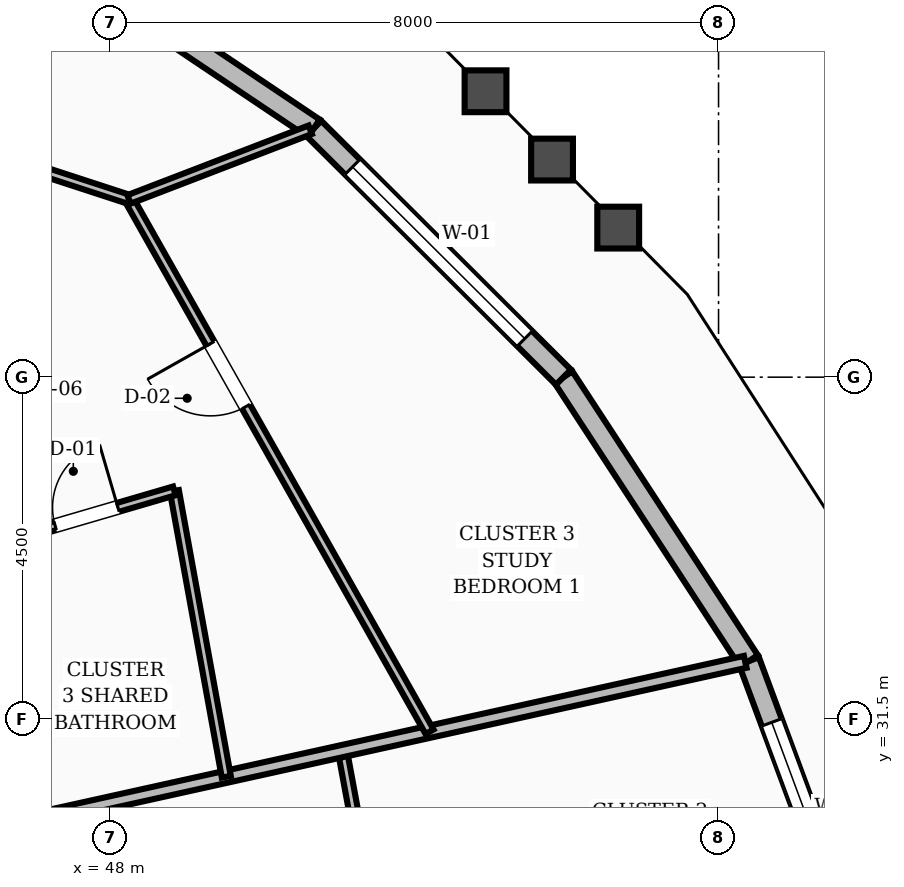
"""IFC4 building model, lengths in metres.
Left out: names, types, materials, properties, quantities, classifications, styles, units other than length and angle.
Written with IfcOpenShell. Run it as: python <this file> out.ifc"""

import sys

from ifc_helpers import new_model, si_unit, direction, frame, frame_2d, origin, place, context, subcontext, project, spatial, rectangle, extrude, element, fill, save


model = new_model("IFC4")
c1 = context("Model", 3, precision=1e-05, world=origin(), true_north=direction((0.0, 1.0)))
c2 = subcontext(c1, "Body", "Model", "MODEL_VIEW")
j1 = project(units=[si_unit("LENGTHUNIT", "METRE"), si_unit("PLANEANGLEUNIT", "RADIAN")], contexts=[c1])
p1 = place(None, origin())
s1 = spatial("IfcSite", under=j1, at=p1, CompositionType="ELEMENT")
p2 = place(p1, origin())
s2 = spatial("IfcBuilding", under=s1, at=p2, CompositionType="ELEMENT")
p3 = place(p2, frame((0.0, 0.0, 146.0)))
s3 = spatial("IfcBuildingStorey", under=s2, at=p3, CompositionType="ELEMENT", Elevation=146.0)
p4 = place(p3, frame((57.903, 28.214, 0.0), z_axis=(0.0, 0.0, 1.0), x_axis=(-0.347777987911, 0.937576914778, 0.0)))
e1 = element("IfcWall", 1, at=p4, inside=s3, PredefinedType="STANDARD", context=c2, shape_type="SweptSolid", body=[
    extrude(rectangle(XDim=4.322, YDim=0.28, at=frame_2d((2.161, 0.0))), origin(), (0.0, 0.0, 1.0), 2.82),
])
p5 = place(p4, frame((0.861, 0.0, 0.8)))
e2 = element("IfcOpeningElement", 2, at=p5, cuts=e1, PredefinedType="OPENING", context=c2, shape_type="SweptSolid", body=[
    extrude(rectangle(XDim=2.6, YDim=1.65, at=frame_2d((1.3, 0.825))), frame((0.0, 0.15, 0.0), z_axis=(0.0, -1.0, 0.0), x_axis=(1.0, 0.0, 0.0)), (0.0, 0.0, 1.0), 0.3),
])
p6 = place(p3, frame((56.4, 32.266, 0.0), z_axis=(0.0, 0.0, 1.0), x_axis=(-0.547087162156, 0.837075645927, 0.0)))
e3 = element("IfcWall", 3, at=p6, inside=s3, PredefinedType="STANDARD", context=c2, shape_type="SweptSolid", body=[
    extrude(rectangle(XDim=4.461, YDim=0.28, at=frame_2d((2.23, 0.0))), origin(), (0.0, 0.0, 1.0), 2.82),
])
p7 = place(p3, frame((53.959, 36.0, 0.0), z_axis=(0.0, 0.0, 1.0), x_axis=(-0.708343047993, 0.70586834917, 0.0)))
e4 = element("IfcWall", 4, at=p7, inside=s3, PredefinedType="STANDARD", context=c2, shape_type="SweptSolid", body=[
    extrude(rectangle(XDim=4.637, YDim=0.28, at=frame_2d((2.318, 0.0))), origin(), (0.0, 0.0, 1.0), 2.82),
])
p8 = place(p7, frame((0.719, 0.0, 0.8)))
e5 = element("IfcOpeningElement", 5, at=p8, cuts=e4, PredefinedType="OPENING", context=c2, shape_type="SweptSolid", body=[
    extrude(rectangle(XDim=3.2, YDim=1.65, at=frame_2d((1.6, 0.825))), frame((0.0, 0.15, 0.0), z_axis=(0.0, -1.0, 0.0), x_axis=(1.0, 0.0, 0.0)), (0.0, 0.0, 1.0), 0.3),
])
p9 = place(p3, frame((50.675, 39.273, 0.0), z_axis=(0.0, 0.0, 1.0), x_axis=(-0.830308520581, 0.557304010977, 0.0)))
e6 = element("IfcWall", 6, at=p9, inside=s3, PredefinedType="STANDARD", context=c2, shape_type="SweptSolid", body=[
    extrude(rectangle(XDim=4.82, YDim=0.28, at=frame_2d((2.41, 0.0))), origin(), (0.0, 0.0, 1.0), 2.82),
])
p10 = place(p3, frame((51.713, 27.508, 0.0), z_axis=(0.0, 0.0, 1.0), x_axis=(-0.182000245683, 0.983298484984, 0.0)))
e7 = element("IfcWall", 7, at=p10, inside=s3, PredefinedType="PARTITIONING", context=c2, shape_type="SweptSolid", body=[
    extrude(rectangle(XDim=3.634, YDim=0.12, at=frame_2d((1.817, 0.0))), origin(), (0.0, 0.0, 1.0), 2.8),
])
p11 = place(p10, frame((1.342, 0.0, 0.0)))
e8 = element("IfcOpeningElement", 8, at=p11, cuts=e7, PredefinedType="OPENING", context=c2, shape_type="SweptSolid", body=[
    extrude(rectangle(XDim=0.95, YDim=2.1, at=frame_2d((0.475, 1.05))), frame((0.0, 0.07, 0.0), z_axis=(0.0, -1.0, 0.0), x_axis=(1.0, 0.0, 0.0)), (0.0, 0.0, 1.0), 0.14),
])
p12 = place(p3, frame((46.85, 30.151, 0.0), z_axis=(0.0, 0.0, 1.0), x_axis=(0.976352651254, 0.216183950352, 0.0)))
e9 = element("IfcWall", 9, at=p12, inside=s3, PredefinedType="SOLIDWALL", context=c2, shape_type="SweptSolid", body=[
    extrude(rectangle(XDim=9.731, YDim=0.16, at=frame_2d((4.866, 0.0))), origin(), (0.0, 0.0, 1.0), 2.8),
])
p13 = place(p3, frame((49.524, 30.743, 0.0), z_axis=(0.0, 0.0, 1.0), x_axis=(-0.178705579988, 0.98390259461, 0.0)))
e10 = element("IfcWall", 10, at=p13, inside=s3, PredefinedType="PARTITIONING", context=c2, shape_type="SweptSolid", body=[
    extrude(rectangle(XDim=3.823, YDim=0.12, at=frame_2d((1.911, 0.0))), origin(), (0.0, 0.0, 1.0), 2.8),
])
p14 = place(p3, frame((46.85, 33.923, 0.0), z_axis=(0.0, 0.0, 1.0), x_axis=(0.959881252976, 0.280406811944, 0.0)))
e11 = element("IfcWall", 11, at=p14, inside=s3, PredefinedType="PARTITIONING", context=c2, shape_type="SweptSolid", body=[
    extrude(rectangle(XDim=2.074, YDim=0.12, at=frame_2d((1.037, 0.0))), origin(), (0.0, 0.0, 1.0), 2.8),
])
p15 = place(p14, frame((0.44, 0.0, 0.0)))
e12 = element("IfcOpeningElement", 12, at=p15, cuts=e11, PredefinedType="OPENING", context=c2, shape_type="SweptSolid", body=[
    extrude(rectangle(XDim=0.86, YDim=2.1, at=frame_2d((0.43, 1.05))), frame((0.0, 0.07, 0.0), z_axis=(0.0, -1.0, 0.0), x_axis=(1.0, 0.0, 0.0)), (0.0, 0.0, 1.0), 0.14),
])
p16 = place(p3, frame((52.198, 31.335, 0.0), z_axis=(0.0, 0.0, 1.0), x_axis=(-0.491634094676, 0.870801881574, 0.0)))
e13 = element("IfcWall", 13, at=p16, inside=s3, PredefinedType="PARTITIONING", context=c2, shape_type="SweptSolid", body=[
    extrude(rectangle(XDim=8.043, YDim=0.12, at=frame_2d((4.021, 0.0))), origin(), (0.0, 0.0, 1.0), 2.8),
])
p17 = place(p16, frame((4.913, 0.0, 0.0)))
e14 = element("IfcOpeningElement", 14, at=p17, cuts=e13, PredefinedType="OPENING", context=c2, shape_type="SweptSolid", body=[
    extrude(rectangle(XDim=0.95, YDim=2.1, at=frame_2d((0.475, 1.05))), frame((0.0, 0.07, 0.0), z_axis=(0.0, -1.0, 0.0), x_axis=(1.0, 0.0, 0.0)), (0.0, 0.0, 1.0), 0.14),
])
p18 = place(p3, frame((48.244, 38.339, 0.0), z_axis=(0.0, 0.0, 1.0), x_axis=(-0.950656085118, 0.310246688667, 0.0)))
e15 = element("IfcWall", 15, at=p18, inside=s3, PredefinedType="PARTITIONING", context=c2, shape_type="SweptSolid", body=[
    extrude(rectangle(XDim=8.593, YDim=0.12, at=frame_2d((4.297, 0.0))), origin(), (0.0, 0.0, 1.0), 2.8),
])
p19 = place(p18, frame((3.822, 0.0, 0.0)))
e16 = element("IfcOpeningElement", 16, at=p19, cuts=e15, PredefinedType="OPENING", context=c2, shape_type="SweptSolid", body=[
    extrude(rectangle(XDim=0.95, YDim=2.1, at=frame_2d((0.475, 1.05))), frame((0.0, 0.07, 0.0), z_axis=(0.0, -1.0, 0.0), x_axis=(1.0, 0.0, 0.0)), (0.0, 0.0, 1.0), 0.14),
])
p20 = place(p3, frame((48.244, 38.339, 0.0), z_axis=(0.0, 0.0, 1.0), x_axis=(0.933458867587, 0.358684460945, 0.0)))
e17 = element("IfcWall", 17, at=p20, inside=s3, PredefinedType="PARTITIONING", context=c2, shape_type="SweptSolid", body=[
    extrude(rectangle(XDim=2.554, YDim=0.12, at=frame_2d((1.277, 0.0))), origin(), (0.0, 0.0, 1.0), 2.8),
])
p21 = place(p5, origin())
e18 = element("IfcWindow", 18, at=p21, inside=s3, PartitioningType="SINGLE_PANEL", PredefinedType="WINDOW", context=c2, shape_type="SweptSolid", body=[
    extrude(rectangle(XDim=2.6, YDim=1.65, at=frame_2d((1.3, 0.825))), frame((0.0, 0.03, 0.0), z_axis=(0.0, -1.0, 0.0), x_axis=(1.0, 0.0, 0.0)), (0.0, 0.0, 1.0), 0.06),
])
fill(e2, e18)
p22 = place(p8, origin())
e19 = element("IfcWindow", 19, at=p22, inside=s3, PartitioningType="SINGLE_PANEL", PredefinedType="WINDOW", context=c2, shape_type="SweptSolid", body=[
    extrude(rectangle(XDim=3.2, YDim=1.65, at=frame_2d((1.6, 0.825))), frame((0.0, 0.03, 0.0), z_axis=(0.0, -1.0, 0.0), x_axis=(1.0, 0.0, 0.0)), (0.0, 0.0, 1.0), 0.06),
])
fill(e5, e19)
p23 = place(p15, origin())
e20 = element("IfcDoor", 20, at=p23, inside=s3, OperationType="SINGLE_SWING_RIGHT", PredefinedType="DOOR", context=c2, shape_type="SweptSolid", body=[
    extrude(rectangle(XDim=0.86, YDim=2.1, at=frame_2d((0.43, 1.05))), frame((0.0, 0.025, 0.0), z_axis=(0.0, -1.0, 0.0), x_axis=(1.0, 0.0, 0.0)), (0.0, 0.0, 1.0), 0.05),
])
fill(e12, e20)
p24 = place(p17, origin())
e21 = element("IfcDoor", 21, at=p24, inside=s3, OperationType="SINGLE_SWING_RIGHT", PredefinedType="DOOR", context=c2, shape_type="SweptSolid", body=[
    extrude(rectangle(XDim=0.95, YDim=2.1, at=frame_2d((0.475, 1.05))), frame((0.0, 0.025, 0.0), z_axis=(0.0, -1.0, 0.0), x_axis=(1.0, 0.0, 0.0)), (0.0, 0.0, 1.0), 0.05),
])
fill(e14, e21)
save(model, sys.argv[1])
